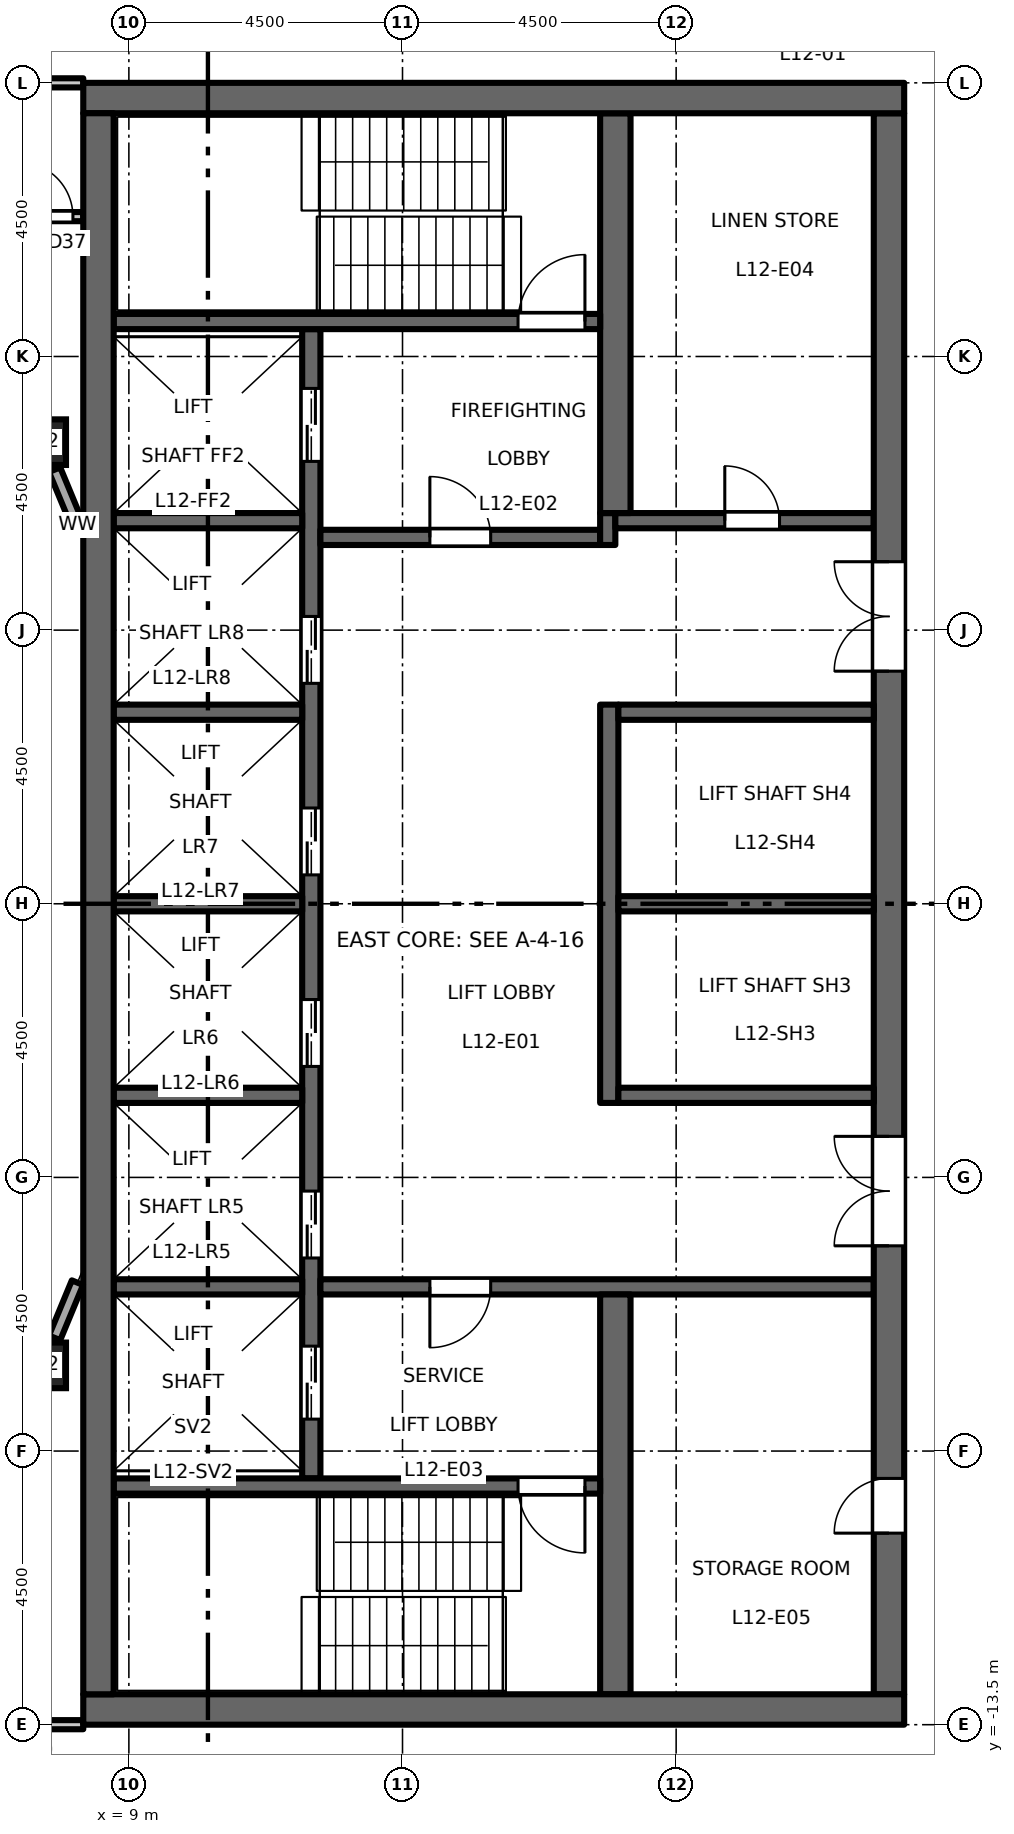
"""IFC4 building model, lengths in metres.
Left out: names, types, materials, properties, quantities, classifications, styles, units other than length and angle.
Written with IfcOpenShell. Run it as: python <this file> out.ifc"""

import sys

from ifc_helpers import new_model, si_unit, direction, frame, frame_2d, origin, origin_2d, place, context, subcontext, project, spatial, rectangle, hollow_rectangle, extrude, element, fill, save


model = new_model("IFC4")
c1 = context("Model", 3, precision=1e-05, world=origin(), true_north=direction((0.0, 1.0)))
c2 = subcontext(c1, "Body", "Model", "MODEL_VIEW")
j1 = project(units=[si_unit("LENGTHUNIT", "METRE"), si_unit("PLANEANGLEUNIT", "RADIAN")], contexts=[c1])
p1 = place(None, origin())
s1 = spatial("IfcSite", under=j1, at=p1, CompositionType="ELEMENT")
p2 = place(p1, origin())
s2 = spatial("IfcBuilding", under=s1, at=p2, CompositionType="ELEMENT")
p3 = place(p2, frame((0.0, 0.0, 58.2)))
s3 = spatial("IfcBuildingStorey", under=s2, at=p3, CompositionType="ELEMENT", Elevation=58.2)
for number, where, z_axis, x_axis in (
    (1, (7.591, -7.591, 0.0), (0.0, 0.0, 1.0), (1.0, 0.0, 0.0)),
    (2, (7.591, 7.591, 0.0), (0.0, 0.0, 1.0), (1.0, 0.0, 0.0)),
):
    element("IfcColumn", number, at=place(p3, frame(where, z_axis=z_axis, x_axis=x_axis)), inside=s3, PredefinedType="COLUMN", context=c2, shape_type="SweptSolid", body=[
        extrude(hollow_rectangle(XDim=0.75, YDim=0.75, WallThickness=0.045, at=origin_2d()), origin(), (0.0, 0.0, 1.0), 4.5),
    ])
p4 = place(p3, frame((12.0, -9.45, 0.0), z_axis=(0.0, 0.0, 1.0), x_axis=(0.0, 1.0, 0.0)))
e3 = element("IfcWall", 3, at=p4, inside=s3, PredefinedType="SHEAR", context=c2, shape_type="SweptSolid", body=[
    extrude(rectangle(XDim=18.9, YDim=0.3, at=frame_2d((9.45, 0.0))), origin(), (0.0, 0.0, 1.0), 4.35),
])
p5 = place(p4, frame((3.625, 0.0, 0.0)))
e4 = element("IfcOpeningElement", 4, at=p5, cuts=e3, PredefinedType="OPENING", context=c2, shape_type="SweptSolid", body=[
    extrude(rectangle(XDim=1.1, YDim=2.1, at=frame_2d((0.55, 1.05))), frame((0.0, 0.16, 0.0), z_axis=(0.0, -1.0, 0.0), x_axis=(1.0, 0.0, 0.0)), (0.0, 0.0, 1.0), 0.32),
])
p6 = place(p4, frame((6.775, 0.0, 0.0)))
e5 = element("IfcOpeningElement", 5, at=p6, cuts=e3, PredefinedType="OPENING", context=c2, shape_type="SweptSolid", body=[
    extrude(rectangle(XDim=1.1, YDim=2.1, at=frame_2d((0.55, 1.05))), frame((0.0, 0.16, 0.0), z_axis=(0.0, -1.0, 0.0), x_axis=(1.0, 0.0, 0.0)), (0.0, 0.0, 1.0), 0.32),
])
p7 = place(p4, frame((9.925, 0.0, 0.0)))
e6 = element("IfcOpeningElement", 6, at=p7, cuts=e3, PredefinedType="OPENING", context=c2, shape_type="SweptSolid", body=[
    extrude(rectangle(XDim=1.1, YDim=2.1, at=frame_2d((0.55, 1.05))), frame((0.0, 0.16, 0.0), z_axis=(0.0, -1.0, 0.0), x_axis=(1.0, 0.0, 0.0)), (0.0, 0.0, 1.0), 0.32),
])
p8 = place(p4, frame((13.075, 0.0, 0.0)))
e7 = element("IfcOpeningElement", 7, at=p8, cuts=e3, PredefinedType="OPENING", context=c2, shape_type="SweptSolid", body=[
    extrude(rectangle(XDim=1.1, YDim=2.1, at=frame_2d((0.55, 1.05))), frame((0.0, 0.16, 0.0), z_axis=(0.0, -1.0, 0.0), x_axis=(1.0, 0.0, 0.0)), (0.0, 0.0, 1.0), 0.32),
])
p9 = place(p4, frame((16.725, 0.0, 0.0)))
e8 = element("IfcOpeningElement", 8, at=p9, cuts=e3, PredefinedType="OPENING", context=c2, shape_type="SweptSolid", body=[
    extrude(rectangle(XDim=1.2, YDim=2.1, at=frame_2d((0.6, 1.05))), frame((0.0, 0.16, 0.0), z_axis=(0.0, -1.0, 0.0), x_axis=(1.0, 0.0, 0.0)), (0.0, 0.0, 1.0), 0.32),
])
p10 = place(p4, frame((0.975, 0.0, 0.0)))
e9 = element("IfcOpeningElement", 9, at=p10, cuts=e3, PredefinedType="OPENING", context=c2, shape_type="SweptSolid", body=[
    extrude(rectangle(XDim=1.2, YDim=2.1, at=frame_2d((0.6, 1.05))), frame((0.0, 0.16, 0.0), z_axis=(0.0, -1.0, 0.0), x_axis=(1.0, 0.0, 0.0)), (0.0, 0.0, 1.0), 0.32),
])
p11 = place(p3, frame((12.15, 6.025, 0.0), z_axis=(0.0, 0.0, 1.0), x_axis=(1.0, 0.0, 0.0)))
e10 = element("IfcWall", 10, at=p11, inside=s3, PredefinedType="SHEAR", context=c2, shape_type="SweptSolid", body=[
    extrude(rectangle(XDim=4.6, YDim=0.25, at=frame_2d((2.3, 0.0))), origin(), (0.0, 0.0, 1.0), 4.35),
])
p12 = place(p11, frame((1.8, 0.0, 0.0)))
e11 = element("IfcOpeningElement", 11, at=p12, cuts=e10, PredefinedType="OPENING", context=c2, shape_type="SweptSolid", body=[
    extrude(rectangle(XDim=1.0, YDim=2.1, at=frame_2d((0.5, 1.05))), frame((0.0, 0.135, 0.0), z_axis=(0.0, -1.0, 0.0), x_axis=(1.0, 0.0, 0.0)), (0.0, 0.0, 1.0), 0.27),
])
p13 = place(p3, frame((16.875, 5.9, 0.0), z_axis=(0.0, 0.0, 1.0), x_axis=(0.0, 1.0, 0.0)))
e12 = element("IfcWall", 12, at=p13, inside=s3, PredefinedType="SHEAR", context=c2, shape_type="SweptSolid", body=[
    extrude(rectangle(XDim=0.525, YDim=0.25, at=frame_2d((0.263, 0.0))), origin(), (0.0, 0.0, 1.0), 4.35),
])
p14 = place(p3, frame((17.0, 6.3, 0.0), z_axis=(0.0, 0.0, 1.0), x_axis=(1.0, 0.0, 0.0)))
e13 = element("IfcWall", 13, at=p14, inside=s3, PredefinedType="SHEAR", context=c2, shape_type="SweptSolid", body=[
    extrude(rectangle(XDim=4.25, YDim=0.25, at=frame_2d((2.125, 0.0))), origin(), (0.0, 0.0, 1.0), 4.35),
])
p15 = place(p14, frame((1.8, 0.0, 0.0)))
e14 = element("IfcOpeningElement", 14, at=p15, cuts=e13, PredefinedType="OPENING", context=c2, shape_type="SweptSolid", body=[
    extrude(rectangle(XDim=0.9, YDim=2.1, at=frame_2d((0.45, 1.05))), frame((0.0, 0.135, 0.0), z_axis=(0.0, -1.0, 0.0), x_axis=(1.0, 0.0, 0.0)), (0.0, 0.0, 1.0), 0.27),
])
p16 = place(p3, frame((12.15, -6.3, 0.0), z_axis=(0.0, 0.0, 1.0), x_axis=(1.0, 0.0, 0.0)))
e15 = element("IfcWall", 15, at=p16, inside=s3, PredefinedType="SHEAR", context=c2, shape_type="SweptSolid", body=[
    extrude(rectangle(XDim=9.1, YDim=0.25, at=frame_2d((4.55, 0.0))), origin(), (0.0, 0.0, 1.0), 4.35),
])
p17 = place(p16, frame((1.8, 0.0, 0.0)))
e16 = element("IfcOpeningElement", 16, at=p17, cuts=e15, PredefinedType="OPENING", context=c2, shape_type="SweptSolid", body=[
    extrude(rectangle(XDim=1.0, YDim=2.1, at=frame_2d((0.5, 1.05))), frame((0.0, 0.135, 0.0), z_axis=(0.0, -1.0, 0.0), x_axis=(1.0, 0.0, 0.0)), (0.0, 0.0, 1.0), 0.27),
])
p18 = place(p3, frame((21.5, -13.0, 0.0), z_axis=(0.0, 0.0, 1.0), x_axis=(0.0, 1.0, 0.0)))
e17 = element("IfcWall", 17, at=p18, inside=s3, PredefinedType="SHEAR", context=c2, shape_type="SweptSolid", body=[
    extrude(rectangle(XDim=26.0, YDim=0.5, at=frame_2d((13.0, 0.0))), origin(), (0.0, 0.0, 1.0), 4.35),
])
p19 = place(p18, frame((16.825, 0.0, 0.0)))
e18 = element("IfcOpeningElement", 18, at=p19, cuts=e17, PredefinedType="OPENING", context=c2, shape_type="SweptSolid", body=[
    extrude(rectangle(XDim=1.8, YDim=2.1, at=frame_2d((0.9, 1.05))), frame((0.0, 0.26, 0.0), z_axis=(0.0, -1.0, 0.0), x_axis=(1.0, 0.0, 0.0)), (0.0, 0.0, 1.0), 0.52),
])
p20 = place(p18, frame((7.375, 0.0, 0.0)))
e19 = element("IfcOpeningElement", 19, at=p20, cuts=e17, PredefinedType="OPENING", context=c2, shape_type="SweptSolid", body=[
    extrude(rectangle(XDim=1.8, YDim=2.1, at=frame_2d((0.9, 1.05))), frame((0.0, 0.26, 0.0), z_axis=(0.0, -1.0, 0.0), x_axis=(1.0, 0.0, 0.0)), (0.0, 0.0, 1.0), 0.52),
])
p21 = place(p18, frame((2.65, 0.0, 0.0)))
e20 = element("IfcOpeningElement", 20, at=p21, cuts=e17, PredefinedType="OPENING", context=c2, shape_type="SweptSolid", body=[
    extrude(rectangle(XDim=0.9, YDim=2.1, at=frame_2d((0.45, 1.05))), frame((0.0, 0.26, 0.0), z_axis=(0.0, -1.0, 0.0), x_axis=(1.0, 0.0, 0.0)), (0.0, 0.0, 1.0), 0.52),
])
p22 = place(p3, frame((16.9, -3.275, 0.0), z_axis=(0.0, 0.0, 1.0), x_axis=(0.0, 1.0, 0.0)))
e21 = element("IfcWall", 21, at=p22, inside=s3, PredefinedType="SHEAR", context=c2, shape_type="SweptSolid", body=[
    extrude(rectangle(XDim=6.55, YDim=0.3, at=frame_2d((3.275, 0.0))), origin(), (0.0, 0.0, 1.0), 4.35),
])
for number, where, z_axis, x_axis in (
    (22, (17.05, 0.0, 0.0), (0.0, 0.0, 1.0), (1.0, 0.0, 0.0)),
    (23, (17.05, 3.15, 0.0), (0.0, 0.0, 1.0), (1.0, 0.0, 0.0)),
    (24, (17.05, -3.15, 0.0), (0.0, 0.0, 1.0), (1.0, 0.0, 0.0)),
):
    element("IfcWall", number, at=place(p3, frame(where, z_axis=z_axis, x_axis=x_axis)), inside=s3, PredefinedType="SHEAR", context=c2, shape_type="SweptSolid", body=[
        extrude(rectangle(XDim=4.2, YDim=0.25, at=frame_2d((2.1, 0.0))), origin(), (0.0, 0.0, 1.0), 4.35),
    ])
for number, where, z_axis, x_axis in (
    (25, (17.0, 6.425, 0.0), (0.0, 0.0, 1.0), (0.0, 1.0, 0.0)),
    (26, (17.0, -13.0, 0.0), (0.0, 0.0, 1.0), (0.0, 1.0, 0.0)),
):
    element("IfcWall", number, at=place(p3, frame(where, z_axis=z_axis, x_axis=x_axis)), inside=s3, PredefinedType="SHEAR", context=c2, shape_type="SweptSolid", body=[
        extrude(rectangle(XDim=6.575, YDim=0.5, at=frame_2d((3.288, 0.0))), origin(), (0.0, 0.0, 1.0), 4.35),
    ])
for number, where, z_axis, x_axis in (
    (27, (8.75, 0.0, 0.0), (0.0, 0.0, 1.0), (1.0, 0.0, 0.0)),
    (28, (8.75, 3.15, 0.0), (0.0, 0.0, 1.0), (1.0, 0.0, 0.0)),
    (29, (8.75, 6.3, 0.0), (0.0, 0.0, 1.0), (1.0, 0.0, 0.0)),
    (30, (8.75, -3.15, 0.0), (0.0, 0.0, 1.0), (1.0, 0.0, 0.0)),
    (31, (8.75, -6.3, 0.0), (0.0, 0.0, 1.0), (1.0, 0.0, 0.0)),
):
    element("IfcWall", number, at=place(p3, frame(where, z_axis=z_axis, x_axis=x_axis)), inside=s3, PredefinedType="SHEAR", context=c2, shape_type="SweptSolid", body=[
        extrude(rectangle(XDim=3.1, YDim=0.25, at=frame_2d((1.55, 0.0))), origin(), (0.0, 0.0, 1.0), 4.35),
    ])
p23 = place(p3, frame((8.75, 9.575, 0.0), z_axis=(0.0, 0.0, 1.0), x_axis=(1.0, 0.0, 0.0)))
e32 = element("IfcWall", 32, at=p23, inside=s3, PredefinedType="SHEAR", context=c2, shape_type="SweptSolid", body=[
    extrude(rectangle(XDim=8.0, YDim=0.25, at=frame_2d((4.0, 0.0))), origin(), (0.0, 0.0, 1.0), 4.35),
])
p24 = place(p23, frame((6.65, 0.0, 0.0)))
e33 = element("IfcOpeningElement", 33, at=p24, cuts=e32, PredefinedType="OPENING", context=c2, shape_type="SweptSolid", body=[
    extrude(rectangle(XDim=1.1, YDim=2.1, at=frame_2d((0.55, 1.05))), frame((0.0, 0.135, 0.0), z_axis=(0.0, -1.0, 0.0), x_axis=(1.0, 0.0, 0.0)), (0.0, 0.0, 1.0), 0.27),
])
p25 = place(p3, frame((8.75, -9.575, 0.0), z_axis=(0.0, 0.0, 1.0), x_axis=(1.0, 0.0, 0.0)))
e34 = element("IfcWall", 34, at=p25, inside=s3, PredefinedType="SHEAR", context=c2, shape_type="SweptSolid", body=[
    extrude(rectangle(XDim=8.0, YDim=0.25, at=frame_2d((4.0, 0.0))), origin(), (0.0, 0.0, 1.0), 4.35),
])
p26 = place(p25, frame((6.65, 0.0, 0.0)))
e35 = element("IfcOpeningElement", 35, at=p26, cuts=e34, PredefinedType="OPENING", context=c2, shape_type="SweptSolid", body=[
    extrude(rectangle(XDim=1.1, YDim=2.1, at=frame_2d((0.55, 1.05))), frame((0.0, 0.135, 0.0), z_axis=(0.0, -1.0, 0.0), x_axis=(1.0, 0.0, 0.0)), (0.0, 0.0, 1.0), 0.27),
])
for number, where, z_axis, x_axis in (
    (36, (8.25, 13.25, 0.0), (0.0, 0.0, 1.0), (1.0, 0.0, 0.0)),
    (37, (8.25, -13.25, 0.0), (0.0, 0.0, 1.0), (1.0, 0.0, 0.0)),
):
    element("IfcWall", number, at=place(p3, frame(where, z_axis=z_axis, x_axis=x_axis)), inside=s3, PredefinedType="SHEAR", context=c2, shape_type="SweptSolid", body=[
        extrude(rectangle(XDim=13.5, YDim=0.5, at=frame_2d((6.75, 0.0))), origin(), (0.0, 0.0, 1.0), 4.35),
    ])
p27 = place(p3, frame((8.5, -13.0, 0.0), z_axis=(0.0, 0.0, 1.0), x_axis=(0.0, 1.0, 0.0)))
e38 = element("IfcWall", 38, at=p27, inside=s3, PredefinedType="SHEAR", context=c2, shape_type="SweptSolid", body=[
    extrude(rectangle(XDim=26.0, YDim=0.5, at=frame_2d((13.0, 0.0))), origin(), (0.0, 0.0, 1.0), 4.35),
])
for number, where, z_axis, x_axis in (
    (39, (7.779, -7.138, 0.0), (0.0, 0.0, 1.0), (0.383, 0.924, 0.0)),
    (40, (8.154, 6.231, 0.0), (0.0, 0.0, 1.0), (-0.383, 0.924, 0.0)),
):
    element("IfcWall", number, at=place(p3, frame(where, z_axis=z_axis, x_axis=x_axis)), inside=s3, PredefinedType="STANDARD", context=c2, shape_type="SweptSolid", body=[
        extrude(rectangle(XDim=0.982, YDim=0.2, at=frame_2d((0.491, 0.0))), origin(), (0.0, 0.0, 1.0), 3.73),
    ])
p28 = place(p3, frame((-8.25, -13.5, 0.0), z_axis=(0.0, 0.0, 1.0), x_axis=(1.0, 0.0, 0.0)))
e41 = element("IfcWall", 41, at=p28, inside=s3, PredefinedType="PARTITIONING", context=c2, shape_type="SweptSolid", body=[
    extrude(rectangle(XDim=16.5, YDim=0.15, at=frame_2d((8.25, 0.0))), origin(), (0.0, 0.0, 1.0), 3.85),
])
p29 = place(p28, frame((0.6, 0.0, 0.0)))
e42 = element("IfcOpeningElement", 42, at=p29, cuts=e41, PredefinedType="OPENING", context=c2, shape_type="SweptSolid", body=[
    extrude(rectangle(XDim=1.0, YDim=2.1, at=frame_2d((0.5, 1.05))), frame((0.0, 0.085, 0.0), z_axis=(0.0, -1.0, 0.0), x_axis=(1.0, 0.0, 0.0)), (0.0, 0.0, 1.0), 0.17),
])
p30 = place(p28, frame((14.85, 0.0, 0.0)))
e43 = element("IfcOpeningElement", 43, at=p30, cuts=e41, PredefinedType="OPENING", context=c2, shape_type="SweptSolid", body=[
    extrude(rectangle(XDim=1.0, YDim=2.1, at=frame_2d((0.5, 1.05))), frame((0.0, 0.085, 0.0), z_axis=(0.0, -1.0, 0.0), x_axis=(1.0, 0.0, 0.0)), (0.0, 0.0, 1.0), 0.17),
])
p31 = place(p3, frame((6.78, 11.3, 0.0), z_axis=(0.0, 0.0, 1.0), x_axis=(1.0, 0.0, 0.0)))
e44 = element("IfcWall", 44, at=p31, inside=s3, PredefinedType="PARTITIONING", context=c2, shape_type="SweptSolid", body=[
    extrude(rectangle(XDim=1.47, YDim=0.15, at=frame_2d((0.735, 0.0))), origin(), (0.0, 0.0, 1.0), 4.35),
])
p32 = place(p31, frame((0.4, 0.0, 0.0)))
e45 = element("IfcOpeningElement", 45, at=p32, cuts=e44, PredefinedType="OPENING", context=c2, shape_type="SweptSolid", body=[
    extrude(rectangle(XDim=0.9, YDim=2.1, at=frame_2d((0.45, 1.05))), frame((0.0, 0.085, 0.0), z_axis=(0.0, -1.0, 0.0), x_axis=(1.0, 0.0, 0.0)), (0.0, 0.0, 1.0), 0.17),
])
p33 = place(p3, frame((-8.25, 13.5, 0.0), z_axis=(0.0, 0.0, 1.0), x_axis=(1.0, 0.0, 0.0)))
e46 = element("IfcWall", 46, at=p33, inside=s3, PredefinedType="PARTITIONING", context=c2, shape_type="SweptSolid", body=[
    extrude(rectangle(XDim=16.5, YDim=0.15, at=frame_2d((8.25, 0.0))), origin(), (0.0, 0.0, 1.0), 3.85),
])
p34 = place(p33, frame((0.65, 0.0, 0.0)))
e47 = element("IfcOpeningElement", 47, at=p34, cuts=e46, PredefinedType="OPENING", context=c2, shape_type="SweptSolid", body=[
    extrude(rectangle(XDim=1.0, YDim=2.1, at=frame_2d((0.5, 1.05))), frame((0.0, 0.085, 0.0), z_axis=(0.0, -1.0, 0.0), x_axis=(1.0, 0.0, 0.0)), (0.0, 0.0, 1.0), 0.17),
])
p35 = place(p12, origin())
e48 = element("IfcDoor", 48, at=p35, inside=s3, OperationType="SINGLE_SWING_RIGHT", PredefinedType="DOOR", context=c2, shape_type="SweptSolid", body=[
    extrude(rectangle(XDim=1.0, YDim=2.1, at=frame_2d((0.5, 1.05))), frame((0.0, 0.025, 0.0), z_axis=(0.0, -1.0, 0.0), x_axis=(1.0, 0.0, 0.0)), (0.0, 0.0, 1.0), 0.05),
])
fill(e11, e48)
p36 = place(p17, origin())
e49 = element("IfcDoor", 49, at=p36, inside=s3, OperationType="SINGLE_SWING_LEFT", PredefinedType="DOOR", context=c2, shape_type="SweptSolid", body=[
    extrude(rectangle(XDim=1.0, YDim=2.1, at=frame_2d((0.5, 1.05))), frame((0.0, 0.025, 0.0), z_axis=(0.0, -1.0, 0.0), x_axis=(1.0, 0.0, 0.0)), (0.0, 0.0, 1.0), 0.05),
])
fill(e16, e49)
p37 = place(p24, origin())
e50 = element("IfcDoor", 50, at=p37, inside=s3, OperationType="SINGLE_SWING_LEFT", PredefinedType="DOOR", context=c2, shape_type="SweptSolid", body=[
    extrude(rectangle(XDim=1.1, YDim=2.1, at=frame_2d((0.55, 1.05))), frame((0.0, 0.025, 0.0), z_axis=(0.0, -1.0, 0.0), x_axis=(1.0, 0.0, 0.0)), (0.0, 0.0, 1.0), 0.05),
])
fill(e33, e50)
p38 = place(p26, origin())
e51 = element("IfcDoor", 51, at=p38, inside=s3, OperationType="SINGLE_SWING_RIGHT", PredefinedType="DOOR", context=c2, shape_type="SweptSolid", body=[
    extrude(rectangle(XDim=1.1, YDim=2.1, at=frame_2d((0.55, 1.05))), frame((0.0, 0.025, 0.0), z_axis=(0.0, -1.0, 0.0), x_axis=(1.0, 0.0, 0.0)), (0.0, 0.0, 1.0), 0.05),
])
fill(e35, e51)
p39 = place(p19, origin())
e52 = element("IfcDoor", 52, at=p39, inside=s3, OperationType="DOUBLE_DOOR_DOUBLE_SWING", PredefinedType="DOOR", context=c2, shape_type="SweptSolid", body=[
    extrude(rectangle(XDim=1.8, YDim=2.1, at=frame_2d((0.9, 1.05))), frame((0.0, 0.025, 0.0), z_axis=(0.0, -1.0, 0.0), x_axis=(1.0, 0.0, 0.0)), (0.0, 0.0, 1.0), 0.05),
])
fill(e18, e52)
p40 = place(p20, origin())
e53 = element("IfcDoor", 53, at=p40, inside=s3, OperationType="DOUBLE_DOOR_DOUBLE_SWING", PredefinedType="DOOR", context=c2, shape_type="SweptSolid", body=[
    extrude(rectangle(XDim=1.8, YDim=2.1, at=frame_2d((0.9, 1.05))), frame((0.0, 0.025, 0.0), z_axis=(0.0, -1.0, 0.0), x_axis=(1.0, 0.0, 0.0)), (0.0, 0.0, 1.0), 0.05),
])
fill(e19, e53)
p41 = place(p5, origin())
e54 = element("IfcDoor", 54, at=p41, inside=s3, OperationType="DOUBLE_DOOR_SLIDING", PredefinedType="DOOR", context=c2, shape_type="SweptSolid", body=[
    extrude(rectangle(XDim=1.1, YDim=2.1, at=frame_2d((0.55, 1.05))), frame((0.0, 0.025, 0.0), z_axis=(0.0, -1.0, 0.0), x_axis=(1.0, 0.0, 0.0)), (0.0, 0.0, 1.0), 0.05),
])
fill(e4, e54)
p42 = place(p6, origin())
e55 = element("IfcDoor", 55, at=p42, inside=s3, OperationType="DOUBLE_DOOR_SLIDING", PredefinedType="DOOR", context=c2, shape_type="SweptSolid", body=[
    extrude(rectangle(XDim=1.1, YDim=2.1, at=frame_2d((0.55, 1.05))), frame((0.0, 0.025, 0.0), z_axis=(0.0, -1.0, 0.0), x_axis=(1.0, 0.0, 0.0)), (0.0, 0.0, 1.0), 0.05),
])
fill(e5, e55)
p43 = place(p7, origin())
e56 = element("IfcDoor", 56, at=p43, inside=s3, OperationType="DOUBLE_DOOR_SLIDING", PredefinedType="DOOR", context=c2, shape_type="SweptSolid", body=[
    extrude(rectangle(XDim=1.1, YDim=2.1, at=frame_2d((0.55, 1.05))), frame((0.0, 0.025, 0.0), z_axis=(0.0, -1.0, 0.0), x_axis=(1.0, 0.0, 0.0)), (0.0, 0.0, 1.0), 0.05),
])
fill(e6, e56)
p44 = place(p8, origin())
e57 = element("IfcDoor", 57, at=p44, inside=s3, OperationType="DOUBLE_DOOR_SLIDING", PredefinedType="DOOR", context=c2, shape_type="SweptSolid", body=[
    extrude(rectangle(XDim=1.1, YDim=2.1, at=frame_2d((0.55, 1.05))), frame((0.0, 0.025, 0.0), z_axis=(0.0, -1.0, 0.0), x_axis=(1.0, 0.0, 0.0)), (0.0, 0.0, 1.0), 0.05),
])
fill(e7, e57)
p45 = place(p9, origin())
e58 = element("IfcDoor", 58, at=p45, inside=s3, OperationType="DOUBLE_DOOR_SLIDING", PredefinedType="DOOR", context=c2, shape_type="SweptSolid", body=[
    extrude(rectangle(XDim=1.2, YDim=2.1, at=frame_2d((0.6, 1.05))), frame((0.0, 0.025, 0.0), z_axis=(0.0, -1.0, 0.0), x_axis=(1.0, 0.0, 0.0)), (0.0, 0.0, 1.0), 0.05),
])
fill(e8, e58)
p46 = place(p10, origin())
e59 = element("IfcDoor", 59, at=p46, inside=s3, OperationType="DOUBLE_DOOR_SLIDING", PredefinedType="DOOR", context=c2, shape_type="SweptSolid", body=[
    extrude(rectangle(XDim=1.2, YDim=2.1, at=frame_2d((0.6, 1.05))), frame((0.0, 0.025, 0.0), z_axis=(0.0, -1.0, 0.0), x_axis=(1.0, 0.0, 0.0)), (0.0, 0.0, 1.0), 0.05),
])
fill(e9, e59)
p47 = place(p15, origin())
e60 = element("IfcDoor", 60, at=p47, inside=s3, OperationType="SINGLE_SWING_RIGHT", PredefinedType="DOOR", context=c2, shape_type="SweptSolid", body=[
    extrude(rectangle(XDim=0.9, YDim=2.1, at=frame_2d((0.45, 1.05))), frame((0.0, 0.025, 0.0), z_axis=(0.0, -1.0, 0.0), x_axis=(1.0, 0.0, 0.0)), (0.0, 0.0, 1.0), 0.05),
])
fill(e14, e60)
p48 = place(p21, origin())
e61 = element("IfcDoor", 61, at=p48, inside=s3, OperationType="SINGLE_SWING_RIGHT", PredefinedType="DOOR", context=c2, shape_type="SweptSolid", body=[
    extrude(rectangle(XDim=0.9, YDim=2.1, at=frame_2d((0.45, 1.05))), frame((0.0, 0.025, 0.0), z_axis=(0.0, -1.0, 0.0), x_axis=(1.0, 0.0, 0.0)), (0.0, 0.0, 1.0), 0.05),
])
fill(e20, e61)
p49 = place(p32, origin())
e62 = element("IfcDoor", 62, at=p49, inside=s3, OperationType="SINGLE_SWING_LEFT", PredefinedType="DOOR", context=c2, shape_type="SweptSolid", body=[
    extrude(rectangle(XDim=0.9, YDim=2.1, at=frame_2d((0.45, 1.05))), frame((0.0, 0.025, 0.0), z_axis=(0.0, -1.0, 0.0), x_axis=(1.0, 0.0, 0.0)), (0.0, 0.0, 1.0), 0.05),
])
fill(e45, e62)
save(model, sys.argv[1])
